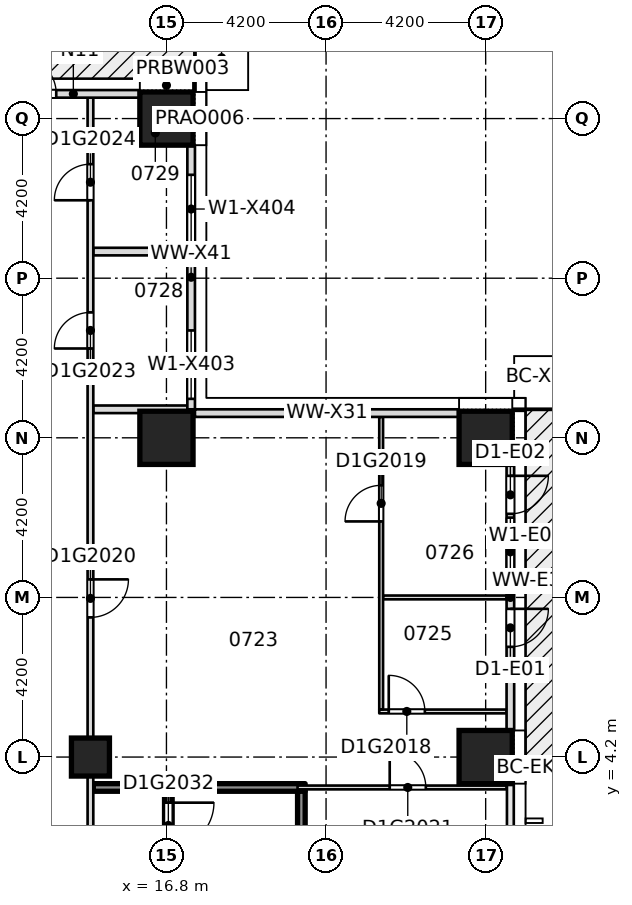
"""IFC4 building model, lengths in metres.
Left out: names, types, materials, properties, quantities, classifications, styles, units other than length and angle.
Written with IfcOpenShell. Run it as: python <this file> out.ifc"""

import sys

from ifc_helpers import new_model, si_unit, direction, frame, frame_2d, origin, origin_2d, place, context, subcontext, project, spatial, rectangle, extrude, element, fill, save


model = new_model("IFC4")
c1 = context("Model", 3, precision=1e-05, world=origin(), true_north=direction((0.0, 1.0)))
c2 = subcontext(c1, "Body", "Model", "MODEL_VIEW")
j1 = project(units=[si_unit("LENGTHUNIT", "METRE"), si_unit("PLANEANGLEUNIT", "RADIAN")], contexts=[c1])
p1 = place(None, origin())
s1 = spatial("IfcSite", under=j1, at=p1, CompositionType="ELEMENT")
p2 = place(p1, origin())
s2 = spatial("IfcBuilding", under=s1, at=p2, CompositionType="ELEMENT")
p3 = place(p2, frame((0.0, 0.0, 37.95)))
s3 = spatial("IfcBuildingStorey", under=s2, at=p3, CompositionType="ELEMENT", Elevation=37.95)
for number, where, z_axis, x_axis in (
    (1, (25.2, 4.2, -0.32), (0.0, 0.0, 1.0), (1.0, 0.0, 0.0)),
    (2, (16.8, 12.6, -0.32), (0.0, 0.0, 1.0), (1.0, 0.0, 0.0)),
    (3, (25.2, 12.6, -0.32), (0.0, 0.0, 1.0), (1.0, 0.0, 0.0)),
    (4, (16.8, 21.0, -0.32), (0.0, 0.0, 1.0), (1.0, 0.0, 0.0)),
):
    element("IfcColumn", number, at=place(p3, frame(where, z_axis=z_axis, x_axis=x_axis)), inside=s3, PredefinedType="COLUMN", context=c2, shape_type="SweptSolid", body=[
        extrude(rectangle(XDim=1.4, YDim=1.4, at=origin_2d()), origin(), (0.0, 0.0, 1.0), 3.45),
    ])
p4 = place(p3, frame((14.8, 4.2, -0.32), z_axis=(0.0, 0.0, 1.0), x_axis=(1.0, 0.0, 0.0)))
e5 = element("IfcColumn", 5, at=p4, inside=s3, PredefinedType="COLUMN", context=c2, shape_type="SweptSolid", body=[
    extrude(rectangle(XDim=1.0, YDim=1.0, at=origin_2d()), origin(), (0.0, 0.0, 1.0), 3.45),
])
p5 = place(p3, frame((14.875, 3.4, 0.0), z_axis=(0.0, 0.0, 1.0), x_axis=(1.0, 0.0, 0.0)))
e6 = element("IfcWall", 6, at=p5, inside=s3, PredefinedType="SOLIDWALL", context=c2, shape_type="SweptSolid", body=[
    extrude(rectangle(XDim=5.575, YDim=0.2, at=frame_2d((2.788, 0.0))), origin(), (0.0, 0.0, 1.0), 3.13),
])
p6 = place(p3, frame((20.25, 3.4, 0.0), z_axis=(0.0, 0.0, 1.0), x_axis=(1.0, 0.0, 0.0)))
e7 = element("IfcWall", 7, at=p6, inside=s3, PredefinedType="PARTITIONING", context=c2, shape_type="SweptSolid", body=[
    extrude(rectangle(XDim=5.5, YDim=0.1, at=frame_2d((2.75, 0.0))), origin(), (0.0, 0.0, 1.0), 3.13),
])
p7 = place(p6, frame((2.425, 0.0, 0.0)))
e8 = element("IfcOpeningElement", 8, at=p7, cuts=e7, PredefinedType="OPENING", context=c2, shape_type="SweptSolid", body=[
    extrude(rectangle(XDim=0.95, YDim=2.1, at=frame_2d((0.475, 1.05))), frame((0.0, 0.06, 0.0), z_axis=(0.0, -1.0, 0.0), x_axis=(1.0, 0.0, 0.0)), (0.0, 0.0, 1.0), 0.12),
])
p8 = place(p3, frame((22.4, 5.4, 0.0), z_axis=(0.0, 0.0, 1.0), x_axis=(1.0, 0.0, 0.0)))
e9 = element("IfcWall", 9, at=p8, inside=s3, PredefinedType="PARTITIONING", context=c2, shape_type="SweptSolid", body=[
    extrude(rectangle(XDim=3.35, YDim=0.1, at=frame_2d((1.675, 0.0))), origin(), (0.0, 0.0, 1.0), 3.13),
])
p9 = place(p8, frame((0.25, 0.0, 0.0)))
e10 = element("IfcOpeningElement", 10, at=p9, cuts=e9, PredefinedType="OPENING", context=c2, shape_type="SweptSolid", body=[
    extrude(rectangle(XDim=0.95, YDim=2.1, at=frame_2d((0.475, 1.05))), frame((0.0, 0.06, 0.0), z_axis=(0.0, -1.0, 0.0), x_axis=(1.0, 0.0, 0.0)), (0.0, 0.0, 1.0), 0.12),
])
p10 = place(p3, frame((22.5, 8.4, 0.0), z_axis=(0.0, 0.0, 1.0), x_axis=(1.0, 0.0, 0.0)))
e11 = element("IfcWall", 11, at=p10, inside=s3, PredefinedType="PARTITIONING", context=c2, shape_type="SweptSolid", body=[
    extrude(rectangle(XDim=3.25, YDim=0.1, at=frame_2d((1.625, 0.0))), origin(), (0.0, 0.0, 1.0), 3.13),
])
for number, where, z_axis, x_axis in (
    (12, (14.875, 13.35, 0.0), (0.0, 0.0, 1.0), (1.0, 0.0, 0.0)),
    (13, (14.875, 17.5, 0.0), (0.0, 0.0, 1.0), (1.0, 0.0, 0.0)),
):
    element("IfcWall", number, at=place(p3, frame(where, z_axis=z_axis, x_axis=x_axis)), inside=s3, PredefinedType="PARTITIONING", context=c2, shape_type="SweptSolid", body=[
        extrude(rectangle(XDim=2.475, YDim=0.2, at=frame_2d((1.238, 0.0))), origin(), (0.0, 0.0, 1.0), 3.13),
    ])
p11 = place(p3, frame((14.8, -6.225, 0.0), z_axis=(0.0, 0.0, 1.0), x_axis=(0.0, 1.0, 0.0)))
e14 = element("IfcWall", 14, at=p11, inside=s3, PredefinedType="PARTITIONING", context=c2, shape_type="SweptSolid", body=[
    extrude(rectangle(XDim=27.775, YDim=0.15, at=frame_2d((13.888, 0.0))), origin(), (0.0, 0.0, 1.0), 3.13),
])
p12 = place(p11, frame((14.1, 0.0, 0.0)))
e15 = element("IfcOpeningElement", 15, at=p12, cuts=e14, PredefinedType="OPENING", context=c2, shape_type="SweptSolid", body=[
    extrude(rectangle(XDim=1.0, YDim=2.1, at=frame_2d((0.5, 1.05))), frame((0.0, 0.085, 0.0), z_axis=(0.0, -1.0, 0.0), x_axis=(1.0, 0.0, 0.0)), (0.0, 0.0, 1.0), 0.17),
])
p13 = place(p11, frame((21.175, 0.0, 0.0)))
e16 = element("IfcOpeningElement", 16, at=p13, cuts=e14, PredefinedType="OPENING", context=c2, shape_type="SweptSolid", body=[
    extrude(rectangle(XDim=0.95, YDim=2.1, at=frame_2d((0.475, 1.05))), frame((0.0, 0.085, 0.0), z_axis=(0.0, -1.0, 0.0), x_axis=(1.0, 0.0, 0.0)), (0.0, 0.0, 1.0), 0.17),
])
p14 = place(p11, frame((25.075, 0.0, 0.0)))
e17 = element("IfcOpeningElement", 17, at=p14, cuts=e14, PredefinedType="OPENING", context=c2, shape_type="SweptSolid", body=[
    extrude(rectangle(XDim=0.95, YDim=2.1, at=frame_2d((0.475, 1.05))), frame((0.0, 0.085, 0.0), z_axis=(0.0, -1.0, 0.0), x_axis=(1.0, 0.0, 0.0)), (0.0, 0.0, 1.0), 0.17),
])
p15 = place(p11, frame((5.675, 0.0, 0.0)))
e18 = element("IfcOpeningElement", 18, at=p15, cuts=e14, PredefinedType="OPENING", context=c2, shape_type="SweptSolid", body=[
    extrude(rectangle(XDim=1.1, YDim=2.1, at=frame_2d((0.55, 1.05))), frame((0.0, 0.085, 0.0), z_axis=(0.0, -1.0, 0.0), x_axis=(1.0, 0.0, 0.0)), (0.0, 0.0, 1.0), 0.17),
])
p16 = place(p3, frame((16.85, -3.3, 0.0), z_axis=(0.0, 0.0, 1.0), x_axis=(0.0, 1.0, 0.0)))
e19 = element("IfcWall", 19, at=p16, inside=s3, PredefinedType="SOLIDWALL", context=c2, shape_type="SweptSolid", body=[
    extrude(rectangle(XDim=6.6, YDim=0.2, at=frame_2d((3.3, 0.0))), origin(), (0.0, 0.0, 1.0), 3.13),
])
p17 = place(p16, frame((5.1, 0.0, 0.0)))
e20 = element("IfcOpeningElement", 20, at=p17, cuts=e19, PredefinedType="OPENING", context=c2, shape_type="SweptSolid", body=[
    extrude(rectangle(XDim=1.2, YDim=2.1, at=frame_2d((0.6, 1.05))), frame((0.0, 0.11, 0.0), z_axis=(0.0, -1.0, 0.0), x_axis=(1.0, 0.0, 0.0)), (0.0, 0.0, 1.0), 0.22),
])
p18 = place(p3, frame((20.35, -0.83, 0.0), z_axis=(0.0, 0.0, 1.0), x_axis=(0.0, 1.0, 0.0)))
e21 = element("IfcWall", 21, at=p18, inside=s3, PredefinedType="SOLIDWALL", context=c2, shape_type="SweptSolid", body=[
    extrude(rectangle(XDim=4.13, YDim=0.2, at=frame_2d((2.065, 0.0))), origin(), (0.0, 0.0, 1.0), 3.13),
])
p19 = place(p3, frame((22.45, 5.45, 0.0), z_axis=(0.0, 0.0, 1.0), x_axis=(0.0, 1.0, 0.0)))
e22 = element("IfcWall", 22, at=p19, inside=s3, PredefinedType="PARTITIONING", context=c2, shape_type="SweptSolid", body=[
    extrude(rectangle(XDim=7.7, YDim=0.1, at=frame_2d((3.85, 0.0))), origin(), (0.0, 0.0, 1.0), 3.13),
])
p20 = place(p19, frame((4.95, 0.0, 0.0)))
e23 = element("IfcOpeningElement", 23, at=p20, cuts=e22, PredefinedType="OPENING", context=c2, shape_type="SweptSolid", body=[
    extrude(rectangle(XDim=0.95, YDim=2.1, at=frame_2d((0.475, 1.05))), frame((0.0, 0.06, 0.0), z_axis=(0.0, -1.0, 0.0), x_axis=(1.0, 0.0, 0.0)), (0.0, 0.0, 1.0), 0.12),
])
p21 = place(p3, frame((25.85, 4.9, 0.0), z_axis=(0.0, 0.0, 1.0), x_axis=(0.0, 1.0, 0.0)))
e24 = element("IfcWall", 24, at=p21, inside=s3, PredefinedType="STANDARD", context=c2, shape_type="SweptSolid", body=[
    extrude(rectangle(XDim=7.0, YDim=0.2, at=frame_2d((3.5, 0.0))), origin(), (0.0, 0.0, 1.0), 3.13),
])
p22 = place(p21, frame((2.2, 0.0, 0.0)))
e25 = element("IfcOpeningElement", 25, at=p22, cuts=e24, PredefinedType="OPENING", context=c2, shape_type="SweptSolid", body=[
    extrude(rectangle(XDim=1.0, YDim=2.4, at=frame_2d((0.5, 1.2))), frame((0.0, 0.11, 0.0), z_axis=(0.0, -1.0, 0.0), x_axis=(1.0, 0.0, 0.0)), (0.0, 0.0, 1.0), 0.22),
])
p23 = place(p21, frame((3.8, 0.0, 0.2)))
e26 = element("IfcOpeningElement", 26, at=p23, cuts=e24, PredefinedType="OPENING", context=c2, shape_type="SweptSolid", body=[
    extrude(rectangle(XDim=1.8, YDim=2.65, at=frame_2d((0.9, 1.325))), frame((0.0, 0.11, 0.0), z_axis=(0.0, -1.0, 0.0), x_axis=(1.0, 0.0, 0.0)), (0.0, 0.0, 1.0), 0.22),
])
p24 = place(p21, frame((5.7, 0.0, 0.0)))
e27 = element("IfcOpeningElement", 27, at=p24, cuts=e24, PredefinedType="OPENING", context=c2, shape_type="SweptSolid", body=[
    extrude(rectangle(XDim=1.0, YDim=2.4, at=frame_2d((0.5, 1.2))), frame((0.0, 0.11, 0.0), z_axis=(0.0, -1.0, 0.0), x_axis=(1.0, 0.0, 0.0)), (0.0, 0.0, 1.0), 0.22),
])
p25 = place(p3, frame((24.5, 13.25, 0.0), z_axis=(0.0, 0.0, 1.0), x_axis=(-1.0, 0.0, 0.0)))
e28 = element("IfcWall", 28, at=p25, inside=s3, PredefinedType="STANDARD", context=c2, shape_type="SweptSolid", body=[
    extrude(rectangle(XDim=6.95, YDim=0.2, at=frame_2d((3.475, 0.0))), origin(), (0.0, 0.0, 1.0), 3.13),
])
p26 = place(p3, frame((17.45, 13.35, 0.0), z_axis=(0.0, 0.0, 1.0), x_axis=(0.0, 1.0, 0.0)))
e29 = element("IfcWall", 29, at=p26, inside=s3, PredefinedType="STANDARD", context=c2, shape_type="SweptSolid", body=[
    extrude(rectangle(XDim=6.95, YDim=0.2, at=frame_2d((3.475, 0.0))), origin(), (0.0, 0.0, 1.0), 3.13),
])
p27 = place(p26, frame((0.275, 0.0, 0.2)))
e30 = element("IfcOpeningElement", 30, at=p27, cuts=e29, PredefinedType="OPENING", context=c2, shape_type="SweptSolid", body=[
    extrude(rectangle(XDim=1.8, YDim=2.65, at=frame_2d((0.9, 1.325))), frame((0.0, 0.11, 0.0), z_axis=(0.0, -1.0, 0.0), x_axis=(1.0, 0.0, 0.0)), (0.0, 0.0, 1.0), 0.22),
])
p28 = place(p26, frame((4.37, 0.0, 0.2)))
e31 = element("IfcOpeningElement", 31, at=p28, cuts=e29, PredefinedType="OPENING", context=c2, shape_type="SweptSolid", body=[
    extrude(rectangle(XDim=1.8, YDim=2.65, at=frame_2d((0.9, 1.325))), frame((0.0, 0.11, 0.0), z_axis=(0.0, -1.0, 0.0), x_axis=(1.0, 0.0, 0.0)), (0.0, 0.0, 1.0), 0.22),
])
p29 = place(p3, frame((16.1, 21.65, 0.0), z_axis=(0.0, 0.0, 1.0), x_axis=(-1.0, 0.0, 0.0)))
e32 = element("IfcWall", 32, at=p29, inside=s3, PredefinedType="STANDARD", context=c2, shape_type="SweptSolid", body=[
    extrude(rectangle(XDim=3.5, YDim=0.2, at=frame_2d((1.75, 0.0))), origin(), (0.0, 0.0, 1.0), 3.13),
])
p30 = place(p29, frame((2.2, 0.0, 0.0)))
e33 = element("IfcOpeningElement", 33, at=p30, cuts=e32, PredefinedType="OPENING", context=c2, shape_type="SweptSolid", body=[
    extrude(rectangle(XDim=1.0, YDim=2.4, at=frame_2d((0.5, 1.2))), frame((0.0, 0.11, 0.0), z_axis=(0.0, -1.0, 0.0), x_axis=(1.0, 0.0, 0.0)), (0.0, 0.0, 1.0), 0.22),
])
p31 = place(p9, origin())
e34 = element("IfcDoor", 34, at=p31, inside=s3, OperationType="SINGLE_SWING_LEFT", PredefinedType="DOOR", context=c2, shape_type="SweptSolid", body=[
    extrude(rectangle(XDim=0.95, YDim=2.1, at=frame_2d((0.475, 1.05))), frame((0.0, 0.025, 0.0), z_axis=(0.0, -1.0, 0.0), x_axis=(1.0, 0.0, 0.0)), (0.0, 0.0, 1.0), 0.05),
])
fill(e10, e34)
p32 = place(p20, origin())
e35 = element("IfcDoor", 35, at=p32, inside=s3, OperationType="SINGLE_SWING_LEFT", PredefinedType="DOOR", context=c2, shape_type="SweptSolid", body=[
    extrude(rectangle(XDim=0.95, YDim=2.1, at=frame_2d((0.475, 1.05))), frame((0.0, 0.025, 0.0), z_axis=(0.0, -1.0, 0.0), x_axis=(1.0, 0.0, 0.0)), (0.0, 0.0, 1.0), 0.05),
])
fill(e23, e35)
p33 = place(p12, origin())
e36 = element("IfcDoor", 36, at=p33, inside=s3, OperationType="SINGLE_SWING_RIGHT", PredefinedType="DOOR", context=c2, shape_type="SweptSolid", body=[
    extrude(rectangle(XDim=1.0, YDim=2.1, at=frame_2d((0.5, 1.05))), frame((0.0, 0.025, 0.0), z_axis=(0.0, -1.0, 0.0), x_axis=(1.0, 0.0, 0.0)), (0.0, 0.0, 1.0), 0.05),
])
fill(e15, e36)
p34 = place(p7, origin())
e37 = element("IfcDoor", 37, at=p34, inside=s3, OperationType="SINGLE_SWING_LEFT", PredefinedType="DOOR", context=c2, shape_type="SweptSolid", body=[
    extrude(rectangle(XDim=0.95, YDim=2.1, at=frame_2d((0.475, 1.05))), frame((0.0, 0.025, 0.0), z_axis=(0.0, -1.0, 0.0), x_axis=(1.0, 0.0, 0.0)), (0.0, 0.0, 1.0), 0.05),
])
fill(e8, e37)
p35 = place(p13, origin())
e38 = element("IfcDoor", 38, at=p35, inside=s3, OperationType="SINGLE_SWING_LEFT", PredefinedType="DOOR", context=c2, shape_type="SweptSolid", body=[
    extrude(rectangle(XDim=0.95, YDim=2.1, at=frame_2d((0.475, 1.05))), frame((0.0, 0.025, 0.0), z_axis=(0.0, -1.0, 0.0), x_axis=(1.0, 0.0, 0.0)), (0.0, 0.0, 1.0), 0.05),
])
fill(e16, e38)
p36 = place(p14, origin())
e39 = element("IfcDoor", 39, at=p36, inside=s3, OperationType="SINGLE_SWING_RIGHT", PredefinedType="DOOR", context=c2, shape_type="SweptSolid", body=[
    extrude(rectangle(XDim=0.95, YDim=2.1, at=frame_2d((0.475, 1.05))), frame((0.0, 0.025, 0.0), z_axis=(0.0, -1.0, 0.0), x_axis=(1.0, 0.0, 0.0)), (0.0, 0.0, 1.0), 0.05),
])
fill(e17, e39)
p37 = place(p17, origin())
e40 = element("IfcDoor", 40, at=p37, inside=s3, OperationType="SINGLE_SWING_LEFT", PredefinedType="DOOR", context=c2, shape_type="SweptSolid", body=[
    extrude(rectangle(XDim=1.2, YDim=2.1, at=frame_2d((0.6, 1.05))), frame((0.0, 0.025, 0.0), z_axis=(0.0, -1.0, 0.0), x_axis=(1.0, 0.0, 0.0)), (0.0, 0.0, 1.0), 0.05),
])
fill(e20, e40)
p38 = place(p22, origin())
e41 = element("IfcDoor", 41, at=p38, inside=s3, OperationType="SINGLE_SWING_LEFT", PredefinedType="DOOR", context=c2, shape_type="SweptSolid", body=[
    extrude(rectangle(XDim=1.0, YDim=2.4, at=frame_2d((0.5, 1.2))), frame((0.0, 0.025, 0.0), z_axis=(0.0, -1.0, 0.0), x_axis=(1.0, 0.0, 0.0)), (0.0, 0.0, 1.0), 0.05),
])
fill(e25, e41)
p39 = place(p23, origin())
e42 = element("IfcWindow", 42, at=p39, inside=s3, PartitioningType="SINGLE_PANEL", PredefinedType="WINDOW", context=c2, shape_type="SweptSolid", body=[
    extrude(rectangle(XDim=1.8, YDim=2.65, at=frame_2d((0.9, 1.325))), frame((0.0, 0.03, 0.0), z_axis=(0.0, -1.0, 0.0), x_axis=(1.0, 0.0, 0.0)), (0.0, 0.0, 1.0), 0.06),
])
fill(e26, e42)
p40 = place(p24, origin())
e43 = element("IfcDoor", 43, at=p40, inside=s3, OperationType="SINGLE_SWING_LEFT", PredefinedType="DOOR", context=c2, shape_type="SweptSolid", body=[
    extrude(rectangle(XDim=1.0, YDim=2.4, at=frame_2d((0.5, 1.2))), frame((0.0, 0.025, 0.0), z_axis=(0.0, -1.0, 0.0), x_axis=(1.0, 0.0, 0.0)), (0.0, 0.0, 1.0), 0.05),
])
fill(e27, e43)
p41 = place(p27, origin())
e44 = element("IfcWindow", 44, at=p41, inside=s3, PartitioningType="SINGLE_PANEL", PredefinedType="WINDOW", context=c2, shape_type="SweptSolid", body=[
    extrude(rectangle(XDim=1.8, YDim=2.65, at=frame_2d((0.9, 1.325))), frame((0.0, 0.03, 0.0), z_axis=(0.0, -1.0, 0.0), x_axis=(1.0, 0.0, 0.0)), (0.0, 0.0, 1.0), 0.06),
])
fill(e30, e44)
p42 = place(p28, origin())
e45 = element("IfcWindow", 45, at=p42, inside=s3, PartitioningType="SINGLE_PANEL", PredefinedType="WINDOW", context=c2, shape_type="SweptSolid", body=[
    extrude(rectangle(XDim=1.8, YDim=2.65, at=frame_2d((0.9, 1.325))), frame((0.0, 0.03, 0.0), z_axis=(0.0, -1.0, 0.0), x_axis=(1.0, 0.0, 0.0)), (0.0, 0.0, 1.0), 0.06),
])
fill(e31, e45)
p43 = place(p30, origin())
e46 = element("IfcDoor", 46, at=p43, inside=s3, OperationType="SINGLE_SWING_LEFT", PredefinedType="DOOR", context=c2, shape_type="SweptSolid", body=[
    extrude(rectangle(XDim=1.0, YDim=2.4, at=frame_2d((0.5, 1.2))), frame((0.0, 0.025, 0.0), z_axis=(0.0, -1.0, 0.0), x_axis=(1.0, 0.0, 0.0)), (0.0, 0.0, 1.0), 0.05),
])
fill(e33, e46)
save(model, sys.argv[1])
